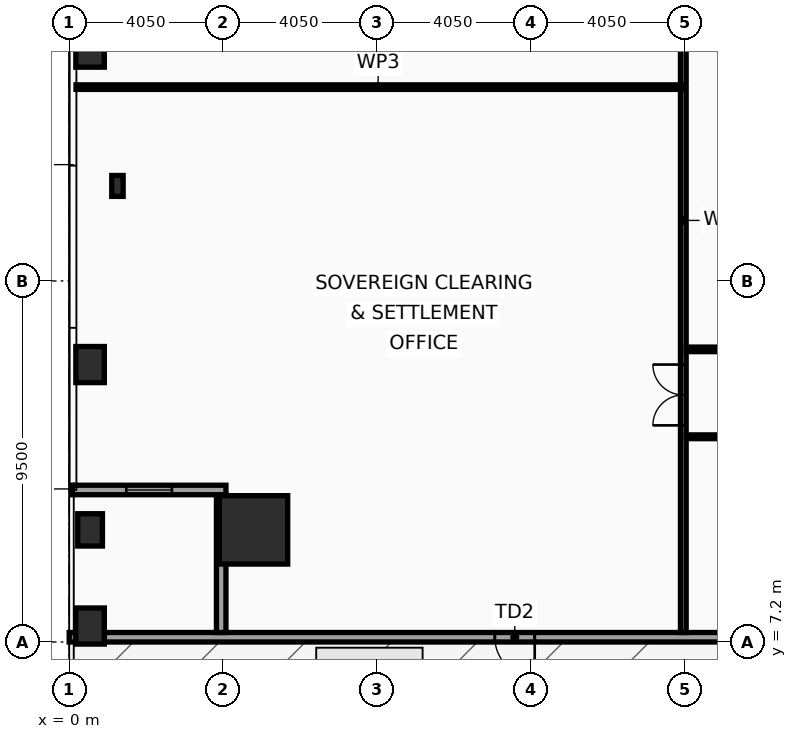
"""IFC4 building model, lengths in metres.
Left out: names, types, materials, properties, quantities, classifications, styles, units other than length and angle.
Written with IfcOpenShell. Run it as: python <this file> out.ifc"""

import sys

from ifc_helpers import new_model, si_unit, direction, frame, frame_2d, origin, origin_2d, place, context, subcontext, project, spatial, rectangle, hollow_rectangle, i_section, extrude, element, fill, save


model = new_model("IFC4")
c1 = context("Model", 3, precision=1e-05, world=origin(), true_north=direction((0.0, 1.0)))
c2 = subcontext(c1, "Body", "Model", "MODEL_VIEW")
j1 = project(units=[si_unit("LENGTHUNIT", "METRE"), si_unit("PLANEANGLEUNIT", "RADIAN")], contexts=[c1])
p1 = place(None, origin())
s1 = spatial("IfcSite", under=j1, at=p1, CompositionType="ELEMENT")
p2 = place(p1, origin())
s2 = spatial("IfcBuilding", under=s1, at=p2, CompositionType="ELEMENT")
p3 = place(p2, frame((0.0, 0.0, 15.4)))
s3 = spatial("IfcBuildingStorey", under=s2, at=p3, CompositionType="ELEMENT", Elevation=15.4)
p4 = place(p3, frame((4.85, 10.15, 0.0), z_axis=(0.0, 0.0, 1.0), x_axis=(1.0, 0.0, 0.0)))
e1 = element("IfcColumn", 1, at=p4, inside=s3, PredefinedType="COLUMN", context=c2, shape_type="SweptSolid", body=[
    extrude(hollow_rectangle(XDim=1.8, YDim=1.8, WallThickness=0.08, at=origin_2d()), origin(), (0.0, 0.0, 1.0), 5.0),
])
p5 = place(p3, frame((1.27, 19.2, 0.0), z_axis=(0.0, 0.0, 1.0), x_axis=(1.0, 0.0, 0.0)))
e2 = element("IfcColumn", 2, at=p5, inside=s3, PredefinedType="COLUMN", context=c2, shape_type="SweptSolid", body=[
    extrude(i_section(OverallWidth=0.3, OverallDepth=0.55, WebThickness=0.015, FlangeThickness=0.029, at=origin_2d()), origin(), (0.0, 0.0, 1.0), 5.0),
])
p6 = place(p3, frame((0.55, 7.62, 0.0), z_axis=(0.0, 0.0, 1.0), x_axis=(1.0, 0.0, 0.0)))
e3 = element("IfcColumn", 3, at=p6, inside=s3, PredefinedType="PILASTER", context=c2, shape_type="SweptSolid", body=[
    extrude(rectangle(XDim=0.75, YDim=0.95, at=origin_2d()), origin(), (0.0, 0.0, 1.0), 5.0),
])
p7 = place(p3, frame((0.55, 10.15, 0.0), z_axis=(0.0, 0.0, 1.0), x_axis=(1.0, 0.0, 0.0)))
e4 = element("IfcColumn", 4, at=p7, inside=s3, PredefinedType="PILASTER", context=c2, shape_type="SweptSolid", body=[
    extrude(rectangle(XDim=0.65, YDim=0.85, at=origin_2d()), origin(), (0.0, 0.0, 1.0), 5.0),
])
for number, where, z_axis, x_axis in (
    (5, (0.55, 14.5, 0.0), (0.0, 0.0, 1.0), (1.0, 0.0, 0.0)),
    (6, (0.55, 22.8, 0.0), (0.0, 0.0, 1.0), (1.0, 0.0, 0.0)),
):
    element("IfcColumn", number, at=place(p3, frame(where, z_axis=z_axis, x_axis=x_axis)), inside=s3, PredefinedType="PILASTER", context=c2, shape_type="SweptSolid", body=[
        extrude(rectangle(XDim=0.75, YDim=0.95, at=origin_2d()), origin(), (0.0, 0.0, 1.0), 5.0),
    ])
p8 = place(p3, frame((72.9, 7.325, 0.0), z_axis=(0.0, 0.0, 1.0), x_axis=(-1.0, 0.0, 0.0)))
e7 = element("IfcWall", 7, at=p8, inside=s3, PredefinedType="SOLIDWALL", context=c2, shape_type="SweptSolid", body=[
    extrude(rectangle(XDim=72.9, YDim=0.25, at=frame_2d((36.45, 0.0))), origin(), (0.0, 0.0, 1.0), 3.87),
])
p9 = place(p8, frame((10.45, 0.0, 0.0)))
e8 = element("IfcOpeningElement", 8, at=p9, cuts=e7, PredefinedType="OPENING", context=c2, shape_type="SweptSolid", body=[
    extrude(rectangle(XDim=1.6, YDim=2.2, at=frame_2d((0.8, 1.1))), frame((0.0, 0.135, 0.0), z_axis=(0.0, -1.0, 0.0), x_axis=(1.0, 0.0, 0.0)), (0.0, 0.0, 1.0), 0.27),
])
p10 = place(p8, frame((29.45, 0.0, 0.0)))
e9 = element("IfcOpeningElement", 9, at=p10, cuts=e7, PredefinedType="OPENING", context=c2, shape_type="SweptSolid", body=[
    extrude(rectangle(XDim=1.6, YDim=2.2, at=frame_2d((0.8, 1.1))), frame((0.0, 0.135, 0.0), z_axis=(0.0, -1.0, 0.0), x_axis=(1.0, 0.0, 0.0)), (0.0, 0.0, 1.0), 0.27),
])
p11 = place(p8, frame((60.65, 0.0, 0.0)))
e10 = element("IfcOpeningElement", 10, at=p11, cuts=e7, PredefinedType="OPENING", context=c2, shape_type="SweptSolid", body=[
    extrude(rectangle(XDim=1.05, YDim=2.15, at=frame_2d((0.525, 1.075))), frame((0.0, 0.135, 0.0), z_axis=(0.0, -1.0, 0.0), x_axis=(1.0, 0.0, 0.0)), (0.0, 0.0, 1.0), 0.27),
])
p12 = place(p8, frame((21.05, 0.0, 0.85)))
e11 = element("IfcOpeningElement", 11, at=p12, cuts=e7, PredefinedType="OPENING", context=c2, shape_type="SweptSolid", body=[
    extrude(rectangle(XDim=2.4, YDim=2.6, at=frame_2d((1.2, 1.3))), frame((0.0, 0.135, 0.0), z_axis=(0.0, -1.0, 0.0), x_axis=(1.0, 0.0, 0.0)), (0.0, 0.0, 1.0), 0.27),
])
p13 = place(p8, frame((49.65, 0.0, 0.85)))
e12 = element("IfcOpeningElement", 12, at=p13, cuts=e7, PredefinedType="OPENING", context=c2, shape_type="SweptSolid", body=[
    extrude(rectangle(XDim=2.4, YDim=2.6, at=frame_2d((1.2, 1.3))), frame((0.0, 0.135, 0.0), z_axis=(0.0, -1.0, 0.0), x_axis=(1.0, 0.0, 0.0)), (0.0, 0.0, 1.0), 0.27),
])
p14 = place(p3, frame((4.125, 11.2, 0.0), z_axis=(0.0, 0.0, 1.0), x_axis=(-1.0, 0.0, 0.0)))
e13 = element("IfcWall", 13, at=p14, inside=s3, PredefinedType="SOLIDWALL", context=c2, shape_type="SweptSolid", body=[
    extrude(rectangle(XDim=4.045, YDim=0.25, at=frame_2d((2.022, 0.0))), origin(), (0.0, 0.0, 1.0), 4.12),
])
p15 = place(p14, frame((1.423, 0.0, 0.9)))
e14 = element("IfcOpeningElement", 14, at=p15, cuts=e13, PredefinedType="OPENING", context=c2, shape_type="SweptSolid", body=[
    extrude(rectangle(XDim=1.2, YDim=2.8, at=frame_2d((0.6, 1.4))), frame((0.0, 0.135, 0.0), z_axis=(0.0, -1.0, 0.0), x_axis=(1.0, 0.0, 0.0)), (0.0, 0.0, 1.0), 0.27),
])
p16 = place(p3, frame((4.0, 7.45, 0.0), z_axis=(0.0, 0.0, 1.0), x_axis=(0.0, 1.0, 0.0)))
e15 = element("IfcWall", 15, at=p16, inside=s3, PredefinedType="SOLIDWALL", context=c2, shape_type="SweptSolid", body=[
    extrude(rectangle(XDim=3.625, YDim=0.25, at=frame_2d((1.812, 0.0))), origin(), (0.0, 0.0, 1.0), 4.12),
])
p17 = place(p3, frame((16.16, 7.45, 0.0), z_axis=(0.0, 0.0, 1.0), x_axis=(0.0, 1.0, 0.0)))
e16 = element("IfcWall", 16, at=p17, inside=s3, PredefinedType="PARTITIONING", context=c2, shape_type="SweptSolid", body=[
    extrude(rectangle(XDim=14.285, YDim=0.15, at=frame_2d((7.143, 0.0))), origin(), (0.0, 0.0, 1.0), 3.87),
])
p18 = place(p17, frame((5.45, 0.0, 0.0)))
e17 = element("IfcOpeningElement", 17, at=p18, cuts=e16, PredefinedType="OPENING", context=c2, shape_type="SweptSolid", body=[
    extrude(rectangle(XDim=1.6, YDim=2.15, at=frame_2d((0.8, 1.075))), frame((0.0, 0.085, 0.0), z_axis=(0.0, -1.0, 0.0), x_axis=(1.0, 0.0, 0.0)), (0.0, 0.0, 1.0), 0.17),
])
p19 = place(p3, frame((16.16, 21.865, 0.0), z_axis=(0.0, 0.0, 1.0), x_axis=(0.0, 1.0, 0.0)))
e18 = element("IfcWall", 18, at=p19, inside=s3, PredefinedType="PARTITIONING", context=c2, shape_type="SweptSolid", body=[
    extrude(rectangle(XDim=13.77, YDim=0.15, at=frame_2d((6.885, 0.0))), origin(), (0.0, 0.0, 1.0), 3.87),
])
p20 = place(p19, frame((5.2, 0.0, 0.0)))
e19 = element("IfcOpeningElement", 19, at=p20, cuts=e18, PredefinedType="OPENING", context=c2, shape_type="SweptSolid", body=[
    extrude(rectangle(XDim=1.0, YDim=2.05, at=frame_2d((0.5, 1.025))), frame((0.0, 0.085, 0.0), z_axis=(0.0, -1.0, 0.0), x_axis=(1.0, 0.0, 0.0)), (0.0, 0.0, 1.0), 0.17),
])
p21 = place(p3, frame((0.18, 21.8, 0.0), z_axis=(0.0, 0.0, 1.0), x_axis=(1.0, 0.0, 0.0)))
e20 = element("IfcWall", 20, at=p21, inside=s3, PredefinedType="PARTITIONING", context=c2, shape_type="SweptSolid", body=[
    extrude(rectangle(XDim=15.9, YDim=0.12, at=frame_2d((7.95, 0.0))), origin(), (0.0, 0.0, 1.0), 4.12),
])
p22 = place(p3, frame((16.24, 12.6, 0.0), z_axis=(0.0, 0.0, 1.0), x_axis=(1.0, 0.0, 0.0)))
e21 = element("IfcWall", 21, at=p22, inside=s3, PredefinedType="MOVABLE", context=c2, shape_type="SweptSolid", body=[
    extrude(rectangle(XDim=20.13, YDim=0.1, at=frame_2d((10.065, 0.0))), origin(), (0.0, 0.0, 1.0), 3.87),
])
p23 = place(p22, frame((8.2, 0.0, 0.0)))
e22 = element("IfcOpeningElement", 22, at=p23, cuts=e21, PredefinedType="OPENING", context=c2, shape_type="SweptSolid", body=[
    extrude(rectangle(XDim=1.6, YDim=2.15, at=frame_2d((0.8, 1.075))), frame((0.0, 0.06, 0.0), z_axis=(0.0, -1.0, 0.0), x_axis=(1.0, 0.0, 0.0)), (0.0, 0.0, 1.0), 0.12),
])
p24 = place(p3, frame((16.24, 14.9, 0.0), z_axis=(0.0, 0.0, 1.0), x_axis=(1.0, 0.0, 0.0)))
e23 = element("IfcWall", 23, at=p24, inside=s3, PredefinedType="PARTITIONING", context=c2, shape_type="SweptSolid", body=[
    extrude(rectangle(XDim=6.555, YDim=0.12, at=frame_2d((3.277, 0.0))), origin(), (0.0, 0.0, 1.0), 3.87),
])
p25 = place(p11, origin())
e24 = element("IfcDoor", 24, at=p25, inside=s3, OperationType="SINGLE_SWING_LEFT", PredefinedType="DOOR", context=c2, shape_type="SweptSolid", body=[
    extrude(rectangle(XDim=1.05, YDim=2.15, at=frame_2d((0.525, 1.075))), frame((0.0, 0.025, 0.0), z_axis=(0.0, -1.0, 0.0), x_axis=(1.0, 0.0, 0.0)), (0.0, 0.0, 1.0), 0.05),
])
fill(e10, e24)
p26 = place(p15, origin())
e25 = element("IfcWindow", 25, at=p26, inside=s3, PartitioningType="SINGLE_PANEL", PredefinedType="WINDOW", context=c2, shape_type="SweptSolid", body=[
    extrude(rectangle(XDim=1.2, YDim=2.8, at=frame_2d((0.6, 1.4))), frame((0.0, 0.03, 0.0), z_axis=(0.0, -1.0, 0.0), x_axis=(1.0, 0.0, 0.0)), (0.0, 0.0, 1.0), 0.06),
])
fill(e14, e25)
p27 = place(p18, origin())
e26 = element("IfcDoor", 26, at=p27, inside=s3, OperationType="DOUBLE_DOOR_SINGLE_SWING", PredefinedType="DOOR", context=c2, shape_type="SweptSolid", body=[
    extrude(rectangle(XDim=1.6, YDim=2.15, at=frame_2d((0.8, 1.075))), frame((0.0, 0.025, 0.0), z_axis=(0.0, -1.0, 0.0), x_axis=(1.0, 0.0, 0.0)), (0.0, 0.0, 1.0), 0.05),
])
fill(e17, e26)
save(model, sys.argv[1])
